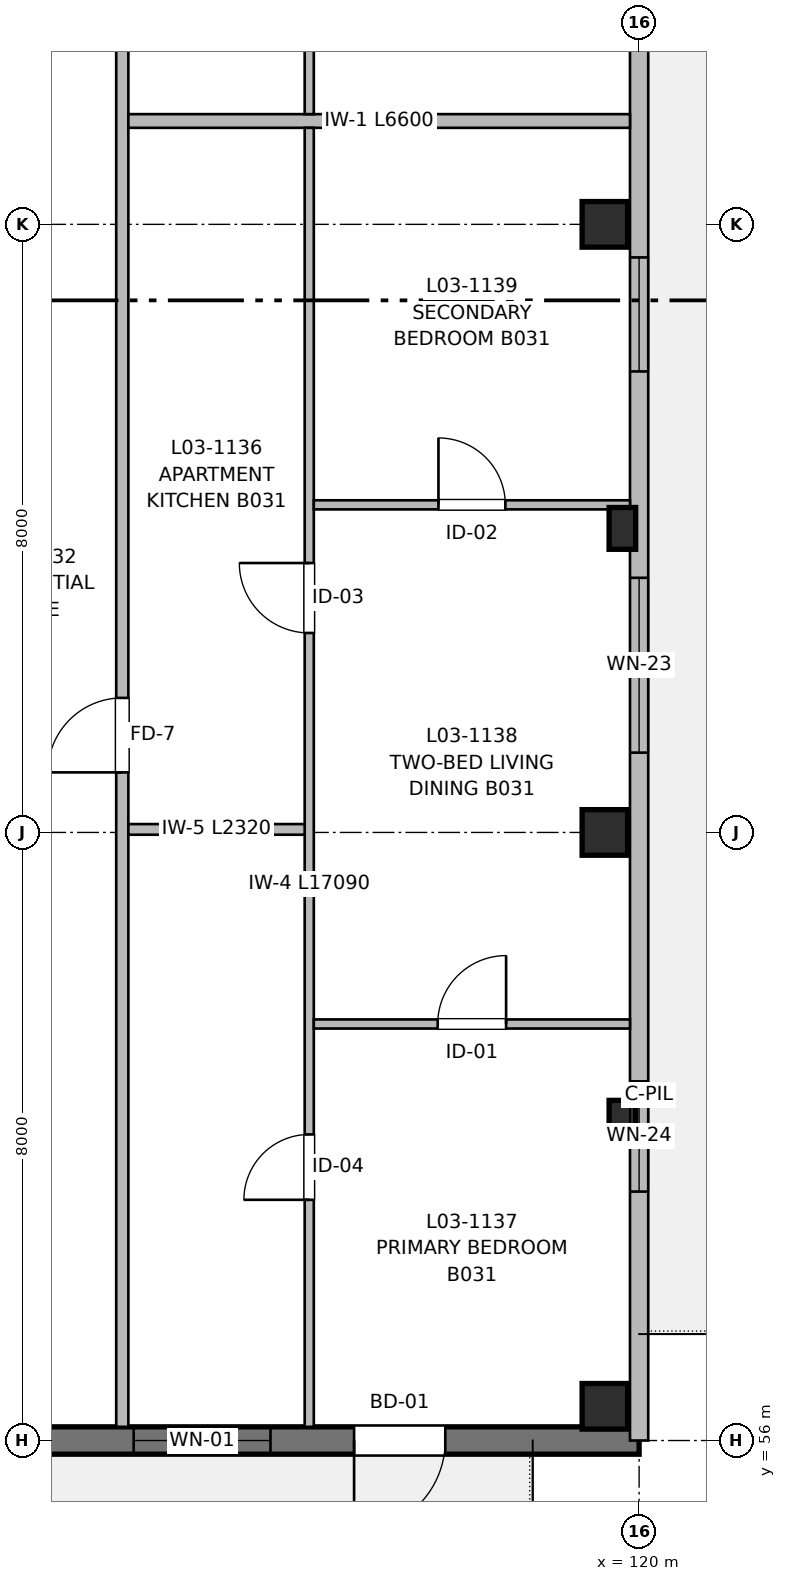
"""IFC4 building model, lengths in metres.
Left out: names, types, materials, properties, quantities, classifications, styles, units other than length and angle.
Written with IfcOpenShell. Run it as: python <this file> out.ifc"""

import sys

from ifc_helpers import new_model, si_unit, direction, frame, frame_2d, origin, origin_2d, place, context, subcontext, project, spatial, rectangle, extrude, element, fill, save


model = new_model("IFC4")
c1 = context("Model", 3, precision=1e-05, world=origin(), true_north=direction((0.0, 1.0)))
c2 = subcontext(c1, "Body", "Model", "MODEL_VIEW")
j1 = project(units=[si_unit("LENGTHUNIT", "METRE"), si_unit("PLANEANGLEUNIT", "RADIAN")], contexts=[c1])
p1 = place(None, origin())
s1 = spatial("IfcSite", under=j1, at=p1, CompositionType="ELEMENT")
p2 = place(p1, origin())
s2 = spatial("IfcBuilding", under=s1, at=p2, CompositionType="ELEMENT")
p3 = place(p2, frame((0.0, 0.0, 10.56)))
s3 = spatial("IfcBuildingStorey", under=s2, at=p3, CompositionType="ELEMENT", Elevation=10.56)
for number, where, z_axis, x_axis in (
    (1, (119.55, 56.45, 0.0), (0.0, 0.0, 1.0), (1.0, 0.0, 0.0)),
    (2, (119.55, 64.0, 0.0), (0.0, 0.0, 1.0), (1.0, 0.0, 0.0)),
    (3, (119.55, 72.0, 0.0), (0.0, 0.0, 1.0), (1.0, 0.0, 0.0)),
):
    element("IfcColumn", number, at=place(p3, frame(where, z_axis=z_axis, x_axis=x_axis)), inside=s3, PredefinedType="COLUMN", context=c2, shape_type="SweptSolid", body=[
        extrude(rectangle(XDim=0.6, YDim=0.6, at=origin_2d()), origin(), (0.0, 0.0, 1.0), 3.2),
    ])
for number, where, z_axis, x_axis in (
    (4, (119.78, 60.2, 0.0), (0.0, 0.0, 1.0), (1.0, 0.0, 0.0)),
    (5, (119.78, 68.0, 0.0), (0.0, 0.0, 1.0), (1.0, 0.0, 0.0)),
):
    element("IfcColumn", number, at=place(p3, frame(where, z_axis=z_axis, x_axis=x_axis)), inside=s3, PredefinedType="PILASTER", context=c2, shape_type="SweptSolid", body=[
        extrude(rectangle(XDim=0.35, YDim=0.55, at=origin_2d()), origin(), (0.0, 0.0, 1.0), 3.2),
    ])
p4 = place(p3, frame((120.0, 56.0, 0.0), z_axis=(0.0, 0.0, 1.0), x_axis=(-1.0, 0.0, 0.0)))
e6 = element("IfcWall", 6, at=p4, inside=s3, PredefinedType="SHEAR", context=c2, shape_type="SweptSolid", body=[
    extrude(rectangle(XDim=16.0, YDim=0.36, at=frame_2d((8.0, 0.0))), origin(), (0.0, 0.0, 1.0), 2.98),
])
p5 = place(p4, frame((2.55, 0.0, 0.0)))
e7 = element("IfcOpeningElement", 7, at=p5, cuts=e6, PredefinedType="OPENING", context=c2, shape_type="SweptSolid", body=[
    extrude(rectangle(XDim=1.2, YDim=2.2, at=frame_2d((0.6, 1.1))), frame((0.0, 0.19, 0.0), z_axis=(0.0, -1.0, 0.0), x_axis=(1.0, 0.0, 0.0)), (0.0, 0.0, 1.0), 0.38),
])
p6 = place(p4, frame((4.85, 0.0, 0.72)))
e8 = element("IfcOpeningElement", 8, at=p6, cuts=e6, PredefinedType="OPENING", context=c2, shape_type="SweptSolid", body=[
    extrude(rectangle(XDim=1.8, YDim=1.5, at=frame_2d((0.9, 0.75))), frame((0.0, 0.19, 0.0), z_axis=(0.0, -1.0, 0.0), x_axis=(1.0, 0.0, 0.0)), (0.0, 0.0, 1.0), 0.38),
])
p7 = place(p4, frame((11.15, 0.0, 0.72)))
e9 = element("IfcOpeningElement", 9, at=p7, cuts=e6, PredefinedType="OPENING", context=c2, shape_type="SweptSolid", body=[
    extrude(rectangle(XDim=1.7, YDim=1.5, at=frame_2d((0.85, 0.75))), frame((0.0, 0.19, 0.0), z_axis=(0.0, -1.0, 0.0), x_axis=(1.0, 0.0, 0.0)), (0.0, 0.0, 1.0), 0.38),
])
p8 = place(p3, frame((120.0, 88.0, 0.0), z_axis=(0.0, 0.0, 1.0), x_axis=(0.0, -1.0, 0.0)))
e10 = element("IfcWall", 10, at=p8, inside=s3, PredefinedType="SOLIDWALL", context=c2, shape_type="SweptSolid", body=[
    extrude(rectangle(XDim=32.0, YDim=0.24, at=frame_2d((16.0, 0.0))), origin(), (0.0, 0.0, 1.0), 2.98),
])
p9 = place(p8, frame((5.0, 0.0, 0.0)))
e11 = element("IfcOpeningElement", 11, at=p9, cuts=e10, PredefinedType="OPENING", context=c2, shape_type="SweptSolid", body=[
    extrude(rectangle(XDim=1.2, YDim=2.2, at=frame_2d((0.6, 1.1))), frame((0.0, 0.13, 0.0), z_axis=(0.0, -1.0, 0.0), x_axis=(1.0, 0.0, 0.0)), (0.0, 0.0, 1.0), 0.26),
])
p10 = place(p8, frame((11.15, 0.0, 0.72)))
e12 = element("IfcOpeningElement", 12, at=p10, cuts=e10, PredefinedType="OPENING", context=c2, shape_type="SweptSolid", body=[
    extrude(rectangle(XDim=1.7, YDim=1.5, at=frame_2d((0.85, 0.75))), frame((0.0, 0.13, 0.0), z_axis=(0.0, -1.0, 0.0), x_axis=(1.0, 0.0, 0.0)), (0.0, 0.0, 1.0), 0.26),
])
p11 = place(p8, frame((20.65, 0.0, 0.57)))
e13 = element("IfcOpeningElement", 13, at=p11, cuts=e10, PredefinedType="OPENING", context=c2, shape_type="SweptSolid", body=[
    extrude(rectangle(XDim=2.3, YDim=1.65, at=frame_2d((1.15, 0.825))), frame((0.0, 0.13, 0.0), z_axis=(0.0, -1.0, 0.0), x_axis=(1.0, 0.0, 0.0)), (0.0, 0.0, 1.0), 0.26),
])
p12 = place(p8, frame((27.275, 0.0, 0.77)))
e14 = element("IfcOpeningElement", 14, at=p12, cuts=e10, PredefinedType="OPENING", context=c2, shape_type="SweptSolid", body=[
    extrude(rectangle(XDim=1.45, YDim=1.45, at=frame_2d((0.725, 0.725))), frame((0.0, 0.13, 0.0), z_axis=(0.0, -1.0, 0.0), x_axis=(1.0, 0.0, 0.0)), (0.0, 0.0, 1.0), 0.26),
])
p13 = place(p8, frame((16.435, 0.0, 0.82)))
e15 = element("IfcOpeningElement", 15, at=p13, cuts=e10, PredefinedType="OPENING", context=c2, shape_type="SweptSolid", body=[
    extrude(rectangle(XDim=1.5, YDim=1.4, at=frame_2d((0.75, 0.7))), frame((0.0, 0.13, 0.0), z_axis=(0.0, -1.0, 0.0), x_axis=(1.0, 0.0, 0.0)), (0.0, 0.0, 1.0), 0.26),
])
p14 = place(p8, frame((0.55, 0.0, 0.82)))
e16 = element("IfcOpeningElement", 16, at=p14, cuts=e10, PredefinedType="OPENING", context=c2, shape_type="SweptSolid", body=[
    extrude(rectangle(XDim=1.5, YDim=1.4, at=frame_2d((0.75, 0.7))), frame((0.0, 0.13, 0.0), z_axis=(0.0, -1.0, 0.0), x_axis=(1.0, 0.0, 0.0)), (0.0, 0.0, 1.0), 0.26),
])
p15 = place(p3, frame((113.2, 56.18, 0.0), z_axis=(0.0, 0.0, 1.0), x_axis=(0.0, 1.0, 0.0)))
e17 = element("IfcWall", 17, at=p15, inside=s3, PredefinedType="PARTITIONING", context=c2, shape_type="SweptSolid", body=[
    extrude(rectangle(XDim=50.62, YDim=0.16, at=frame_2d((25.31, 0.0))), origin(), (0.0, 0.0, 1.0), 2.935),
])
p16 = place(p15, frame((8.61, 0.0, 0.0)))
e18 = element("IfcOpeningElement", 18, at=p16, cuts=e17, PredefinedType="OPENING", context=c2, shape_type="SweptSolid", body=[
    extrude(rectangle(XDim=0.98, YDim=2.15, at=frame_2d((0.49, 1.075))), frame((0.0, 0.09, 0.0), z_axis=(0.0, -1.0, 0.0), x_axis=(1.0, 0.0, 0.0)), (0.0, 0.0, 1.0), 0.18),
])
p17 = place(p15, frame((25.84, 0.0, 0.0)))
e19 = element("IfcOpeningElement", 19, at=p17, cuts=e17, PredefinedType="OPENING", context=c2, shape_type="SweptSolid", body=[
    extrude(rectangle(XDim=1.02, YDim=2.15, at=frame_2d((0.51, 1.075))), frame((0.0, 0.09, 0.0), z_axis=(0.0, -1.0, 0.0), x_axis=(1.0, 0.0, 0.0)), (0.0, 0.0, 1.0), 0.18),
])
p18 = place(p15, frame((42.61, 0.0, 0.0)))
e20 = element("IfcOpeningElement", 20, at=p18, cuts=e17, PredefinedType="OPENING", context=c2, shape_type="SweptSolid", body=[
    extrude(rectangle(XDim=0.98, YDim=2.15, at=frame_2d((0.49, 1.075))), frame((0.0, 0.09, 0.0), z_axis=(0.0, -1.0, 0.0), x_axis=(1.0, 0.0, 0.0)), (0.0, 0.0, 1.0), 0.18),
])
p19 = place(p3, frame((113.28, 73.36, 0.0), z_axis=(0.0, 0.0, 1.0), x_axis=(1.0, 0.0, 0.0)))
e21 = element("IfcWall", 21, at=p19, inside=s3, PredefinedType="PARTITIONING", context=c2, shape_type="SweptSolid", body=[
    extrude(rectangle(XDim=6.6, YDim=0.18, at=frame_2d((3.3, 0.0))), origin(), (0.0, 0.0, 1.0), 2.935),
])
p20 = place(p3, frame((115.66, 56.18, 0.0), z_axis=(0.0, 0.0, 1.0), x_axis=(0.0, 1.0, 0.0)))
e22 = element("IfcWall", 22, at=p20, inside=s3, PredefinedType="PARTITIONING", context=c2, shape_type="SweptSolid", body=[
    extrude(rectangle(XDim=17.09, YDim=0.12, at=frame_2d((8.545, 0.0))), origin(), (0.0, 0.0, 1.0), 2.935),
])
p21 = place(p20, frame((2.987, 0.0, 0.0)))
e23 = element("IfcOpeningElement", 23, at=p21, cuts=e22, PredefinedType="OPENING", context=c2, shape_type="SweptSolid", body=[
    extrude(rectangle(XDim=0.86, YDim=2.1, at=frame_2d((0.43, 1.05))), frame((0.0, 0.07, 0.0), z_axis=(0.0, -1.0, 0.0), x_axis=(1.0, 0.0, 0.0)), (0.0, 0.0, 1.0), 0.14),
])
p22 = place(p20, frame((10.444, 0.0, 0.0)))
e24 = element("IfcOpeningElement", 24, at=p22, cuts=e22, PredefinedType="OPENING", context=c2, shape_type="SweptSolid", body=[
    extrude(rectangle(XDim=0.92, YDim=2.1, at=frame_2d((0.46, 1.05))), frame((0.0, 0.07, 0.0), z_axis=(0.0, -1.0, 0.0), x_axis=(1.0, 0.0, 0.0)), (0.0, 0.0, 1.0), 0.14),
])
p23 = place(p3, frame((113.28, 64.04, 0.0), z_axis=(0.0, 0.0, 1.0), x_axis=(1.0, 0.0, 0.0)))
e25 = element("IfcWall", 25, at=p23, inside=s3, PredefinedType="PARTITIONING", context=c2, shape_type="SweptSolid", body=[
    extrude(rectangle(XDim=2.32, YDim=0.14, at=frame_2d((1.16, 0.0))), origin(), (0.0, 0.0, 1.0), 2.53),
])
p24 = place(p3, frame((115.72, 61.48, 0.0), z_axis=(0.0, 0.0, 1.0), x_axis=(1.0, 0.0, 0.0)))
e26 = element("IfcWall", 26, at=p24, inside=s3, PredefinedType="PARTITIONING", context=c2, shape_type="SweptSolid", body=[
    extrude(rectangle(XDim=4.16, YDim=0.12, at=frame_2d((2.08, 0.0))), origin(), (0.0, 0.0, 1.0), 2.935),
])
p25 = place(p24, frame((1.63, 0.0, 0.0)))
e27 = element("IfcOpeningElement", 27, at=p25, cuts=e26, PredefinedType="OPENING", context=c2, shape_type="SweptSolid", body=[
    extrude(rectangle(XDim=0.9, YDim=2.1, at=frame_2d((0.45, 1.05))), frame((0.0, 0.07, 0.0), z_axis=(0.0, -1.0, 0.0), x_axis=(1.0, 0.0, 0.0)), (0.0, 0.0, 1.0), 0.14),
])
p26 = place(p3, frame((115.72, 68.31, 0.0), z_axis=(0.0, 0.0, 1.0), x_axis=(1.0, 0.0, 0.0)))
e28 = element("IfcWall", 28, at=p26, inside=s3, PredefinedType="PARTITIONING", context=c2, shape_type="SweptSolid", body=[
    extrude(rectangle(XDim=4.16, YDim=0.12, at=frame_2d((2.08, 0.0))), origin(), (0.0, 0.0, 1.0), 2.935),
])
p27 = place(p26, frame((1.64, 0.0, 0.0)))
e29 = element("IfcOpeningElement", 29, at=p27, cuts=e28, PredefinedType="OPENING", context=c2, shape_type="SweptSolid", body=[
    extrude(rectangle(XDim=0.88, YDim=2.1, at=frame_2d((0.44, 1.05))), frame((0.0, 0.07, 0.0), z_axis=(0.0, -1.0, 0.0), x_axis=(1.0, 0.0, 0.0)), (0.0, 0.0, 1.0), 0.14),
])
p28 = place(p3, frame((115.66, 73.45, 0.0), z_axis=(0.0, 0.0, 1.0), x_axis=(0.0, 1.0, 0.0)))
e30 = element("IfcWall", 30, at=p28, inside=s3, PredefinedType="PARTITIONING", context=c2, shape_type="SweptSolid", body=[
    extrude(rectangle(XDim=17.01, YDim=0.12, at=frame_2d((8.505, 0.0))), origin(), (0.0, 0.0, 1.0), 2.935),
])
p29 = place(p28, frame((2.972, 0.0, 0.0)))
e31 = element("IfcOpeningElement", 31, at=p29, cuts=e30, PredefinedType="OPENING", context=c2, shape_type="SweptSolid", body=[
    extrude(rectangle(XDim=0.94, YDim=2.1, at=frame_2d((0.47, 1.05))), frame((0.0, 0.07, 0.0), z_axis=(0.0, -1.0, 0.0), x_axis=(1.0, 0.0, 0.0)), (0.0, 0.0, 1.0), 0.14),
])
p30 = place(p28, frame((10.393, 0.0, 0.0)))
e32 = element("IfcOpeningElement", 32, at=p30, cuts=e30, PredefinedType="OPENING", context=c2, shape_type="SweptSolid", body=[
    extrude(rectangle(XDim=0.92, YDim=2.1, at=frame_2d((0.46, 1.05))), frame((0.0, 0.07, 0.0), z_axis=(0.0, -1.0, 0.0), x_axis=(1.0, 0.0, 0.0)), (0.0, 0.0, 1.0), 0.14),
])
p31 = place(p5, origin())
e33 = element("IfcDoor", 33, at=p31, inside=s3, OperationType="SINGLE_SWING_RIGHT", PredefinedType="DOOR", context=c2, shape_type="SweptSolid", body=[
    extrude(rectangle(XDim=1.2, YDim=2.2, at=frame_2d((0.6, 1.1))), frame((0.0, 0.025, 0.0), z_axis=(0.0, -1.0, 0.0), x_axis=(1.0, 0.0, 0.0)), (0.0, 0.0, 1.0), 0.05),
])
fill(e7, e33)
p32 = place(p6, origin())
e34 = element("IfcWindow", 34, at=p32, inside=s3, PartitioningType="SINGLE_PANEL", PredefinedType="WINDOW", context=c2, shape_type="SweptSolid", body=[
    extrude(rectangle(XDim=1.8, YDim=1.5, at=frame_2d((0.9, 0.75))), frame((0.0, 0.03, 0.0), z_axis=(0.0, -1.0, 0.0), x_axis=(1.0, 0.0, 0.0)), (0.0, 0.0, 1.0), 0.06),
])
fill(e8, e34)
p33 = place(p11, origin())
e35 = element("IfcWindow", 35, at=p33, inside=s3, PartitioningType="SINGLE_PANEL", PredefinedType="WINDOW", context=c2, shape_type="SweptSolid", body=[
    extrude(rectangle(XDim=2.3, YDim=1.65, at=frame_2d((1.15, 0.825))), frame((0.0, 0.03, 0.0), z_axis=(0.0, -1.0, 0.0), x_axis=(1.0, 0.0, 0.0)), (0.0, 0.0, 1.0), 0.06),
])
fill(e13, e35)
p34 = place(p12, origin())
e36 = element("IfcWindow", 36, at=p34, inside=s3, PartitioningType="SINGLE_PANEL", PredefinedType="WINDOW", context=c2, shape_type="SweptSolid", body=[
    extrude(rectangle(XDim=1.45, YDim=1.45, at=frame_2d((0.725, 0.725))), frame((0.0, 0.03, 0.0), z_axis=(0.0, -1.0, 0.0), x_axis=(1.0, 0.0, 0.0)), (0.0, 0.0, 1.0), 0.06),
])
fill(e14, e36)
p35 = place(p21, origin())
e37 = element("IfcDoor", 37, at=p35, inside=s3, OperationType="SINGLE_SWING_LEFT", PredefinedType="DOOR", context=c2, shape_type="SweptSolid", body=[
    extrude(rectangle(XDim=0.86, YDim=2.1, at=frame_2d((0.43, 1.05))), frame((0.0, 0.025, 0.0), z_axis=(0.0, -1.0, 0.0), x_axis=(1.0, 0.0, 0.0)), (0.0, 0.0, 1.0), 0.05),
])
fill(e23, e37)
p36 = place(p22, origin())
e38 = element("IfcDoor", 38, at=p36, inside=s3, OperationType="SINGLE_SWING_RIGHT", PredefinedType="DOOR", context=c2, shape_type="SweptSolid", body=[
    extrude(rectangle(XDim=0.92, YDim=2.1, at=frame_2d((0.46, 1.05))), frame((0.0, 0.025, 0.0), z_axis=(0.0, -1.0, 0.0), x_axis=(1.0, 0.0, 0.0)), (0.0, 0.0, 1.0), 0.05),
])
fill(e24, e38)
p37 = place(p16, origin())
e39 = element("IfcDoor", 39, at=p37, inside=s3, OperationType="SINGLE_SWING_LEFT", PredefinedType="DOOR", context=c2, shape_type="SweptSolid", body=[
    extrude(rectangle(XDim=0.98, YDim=2.15, at=frame_2d((0.49, 1.075))), frame((0.0, 0.025, 0.0), z_axis=(0.0, -1.0, 0.0), x_axis=(1.0, 0.0, 0.0)), (0.0, 0.0, 1.0), 0.05),
])
fill(e18, e39)
p38 = place(p25, origin())
e40 = element("IfcDoor", 40, at=p38, inside=s3, OperationType="SINGLE_SWING_RIGHT", PredefinedType="DOOR", context=c2, shape_type="SweptSolid", body=[
    extrude(rectangle(XDim=0.9, YDim=2.1, at=frame_2d((0.45, 1.05))), frame((0.0, 0.025, 0.0), z_axis=(0.0, -1.0, 0.0), x_axis=(1.0, 0.0, 0.0)), (0.0, 0.0, 1.0), 0.05),
])
fill(e27, e40)
p39 = place(p27, origin())
e41 = element("IfcDoor", 41, at=p39, inside=s3, OperationType="SINGLE_SWING_LEFT", PredefinedType="DOOR", context=c2, shape_type="SweptSolid", body=[
    extrude(rectangle(XDim=0.88, YDim=2.1, at=frame_2d((0.44, 1.05))), frame((0.0, 0.025, 0.0), z_axis=(0.0, -1.0, 0.0), x_axis=(1.0, 0.0, 0.0)), (0.0, 0.0, 1.0), 0.05),
])
fill(e29, e41)
p40 = place(p13, origin())
e42 = element("IfcWindow", 42, at=p40, inside=s3, PartitioningType="SINGLE_PANEL", PredefinedType="WINDOW", context=c2, shape_type="SweptSolid", body=[
    extrude(rectangle(XDim=1.5, YDim=1.4, at=frame_2d((0.75, 0.7))), frame((0.0, 0.03, 0.0), z_axis=(0.0, -1.0, 0.0), x_axis=(1.0, 0.0, 0.0)), (0.0, 0.0, 1.0), 0.06),
])
fill(e15, e42)
save(model, sys.argv[1])
